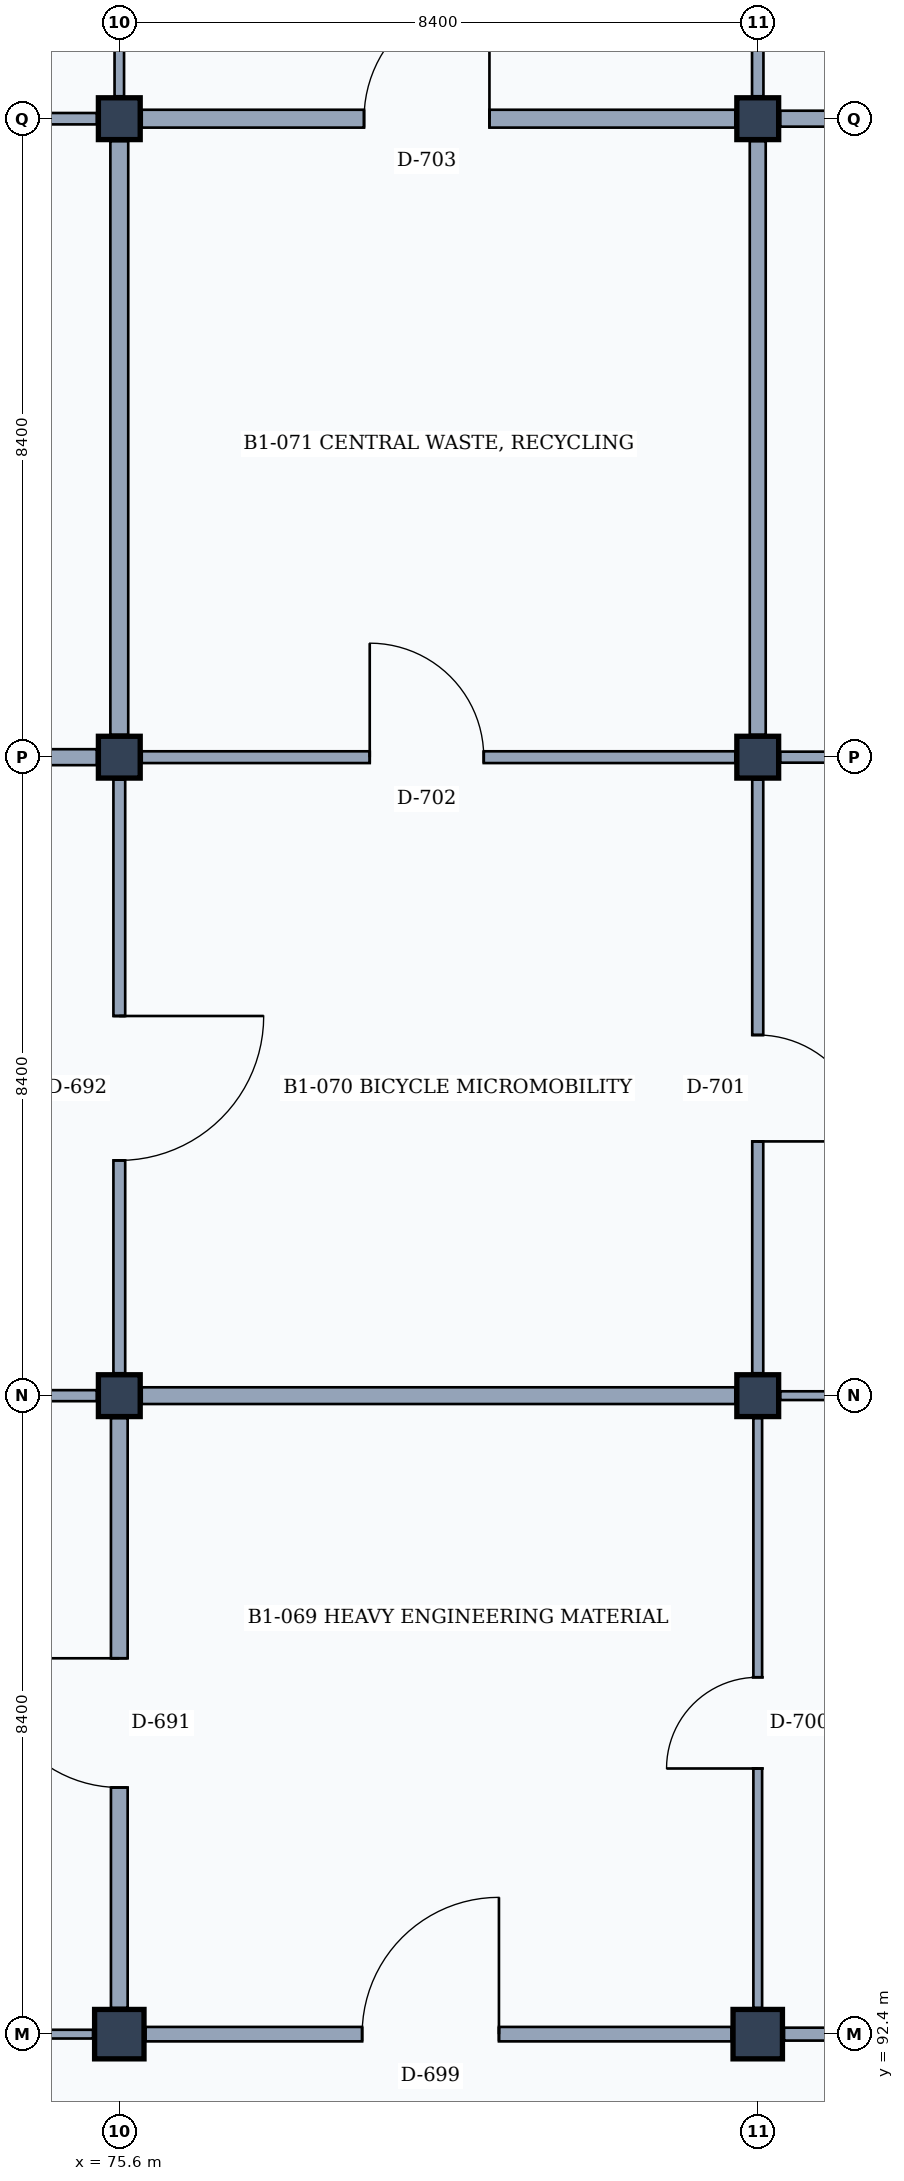
"""IFC4 building model, lengths in metres.
Left out: names, types, materials, properties, quantities, classifications, styles, units other than length and angle.
Written with IfcOpenShell. Run it as: python <this file> out.ifc"""

import sys

from ifc_helpers import new_model, si_unit, direction, frame, frame_2d, origin, origin_2d, place, context, subcontext, project, spatial, rectangle, extrude, element, fill, save


model = new_model("IFC4")
c1 = context("Model", 3, precision=1e-05, world=origin(), true_north=direction((0.0, 1.0)))
c2 = subcontext(c1, "Body", "Model", "MODEL_VIEW")
j1 = project(units=[si_unit("LENGTHUNIT", "METRE"), si_unit("PLANEANGLEUNIT", "RADIAN")], contexts=[c1])
p1 = place(None, origin())
s1 = spatial("IfcSite", under=j1, at=p1, CompositionType="ELEMENT")
p2 = place(p1, origin())
s2 = spatial("IfcBuilding", under=s1, at=p2, CompositionType="ELEMENT")
p3 = place(p2, frame((0.0, 0.0, -4.2)))
s3 = spatial("IfcBuildingStorey", under=s2, at=p3, CompositionType="ELEMENT", Elevation=-4.2)
p4 = place(p3, frame((75.6, 92.4, 0.0), z_axis=(0.0, 0.0, 1.0), x_axis=(1.0, 0.0, 0.0)))
e1 = element("IfcColumn", 1, at=p4, inside=s3, PredefinedType="COLUMN", context=c2, shape_type="SweptSolid", body=[
    extrude(rectangle(XDim=0.65, YDim=0.65, at=origin_2d()), origin(), (0.0, 0.0, 1.0), 4.2),
])
for number, where, z_axis, x_axis in (
    (2, (75.6, 100.8, 0.0), (0.0, 0.0, 1.0), (1.0, 0.0, 0.0)),
    (3, (75.6, 109.2, 0.0), (0.0, 0.0, 1.0), (1.0, 0.0, 0.0)),
    (4, (75.6, 117.6, 0.0), (0.0, 0.0, 1.0), (1.0, 0.0, 0.0)),
):
    element("IfcColumn", number, at=place(p3, frame(where, z_axis=z_axis, x_axis=x_axis)), inside=s3, PredefinedType="COLUMN", context=c2, shape_type="SweptSolid", body=[
        extrude(rectangle(XDim=0.55, YDim=0.55, at=origin_2d()), origin(), (0.0, 0.0, 1.0), 4.2),
    ])
p5 = place(p3, frame((84.0, 92.4, 0.0), z_axis=(0.0, 0.0, 1.0), x_axis=(1.0, 0.0, 0.0)))
e5 = element("IfcColumn", 5, at=p5, inside=s3, PredefinedType="COLUMN", context=c2, shape_type="SweptSolid", body=[
    extrude(rectangle(XDim=0.65, YDim=0.65, at=origin_2d()), origin(), (0.0, 0.0, 1.0), 4.2),
])
for number, where, z_axis, x_axis in (
    (6, (84.0, 100.8, 0.0), (0.0, 0.0, 1.0), (1.0, 0.0, 0.0)),
    (7, (84.0, 109.2, 0.0), (0.0, 0.0, 1.0), (1.0, 0.0, 0.0)),
    (8, (84.0, 117.6, 0.0), (0.0, 0.0, 1.0), (1.0, 0.0, 0.0)),
):
    element("IfcColumn", number, at=place(p3, frame(where, z_axis=z_axis, x_axis=x_axis)), inside=s3, PredefinedType="COLUMN", context=c2, shape_type="SweptSolid", body=[
        extrude(rectangle(XDim=0.55, YDim=0.55, at=origin_2d()), origin(), (0.0, 0.0, 1.0), 4.2),
    ])
p6 = place(p3, frame((67.545, 92.4, 0.0), z_axis=(0.0, 0.0, 1.0), x_axis=(1.0, 0.0, 0.0)))
e9 = element("IfcWall", 9, at=p6, inside=s3, PredefinedType="PARTITIONING", context=c2, shape_type="SweptSolid", body=[
    extrude(rectangle(XDim=7.71, YDim=0.115, at=frame_2d((3.855, 0.0))), origin(), (0.0, 0.0, 1.0), 2.93),
])
p7 = place(p6, frame((2.975, 0.0, 0.0)))
e10 = element("IfcOpeningElement", 10, at=p7, cuts=e9, PredefinedType="OPENING", context=c2, shape_type="SweptSolid", body=[
    extrude(rectangle(XDim=1.55, YDim=2.35, at=frame_2d((0.775, 1.175))), frame((0.0, 0.067, 0.0), z_axis=(0.0, -1.0, 0.0), x_axis=(1.0, 0.0, 0.0)), (0.0, 0.0, 1.0), 0.135),
])
p8 = place(p3, frame((75.6, 92.745, 0.0), z_axis=(0.0, 0.0, 1.0), x_axis=(0.0, 1.0, 0.0)))
e11 = element("IfcWall", 11, at=p8, inside=s3, PredefinedType="PARTITIONING", context=c2, shape_type="SweptSolid", body=[
    extrude(rectangle(XDim=7.76, YDim=0.22, at=frame_2d((3.88, 0.0))), origin(), (0.0, 0.0, 1.0), 3.23),
])
p9 = place(p8, frame((2.9, 0.0, 0.0)))
e12 = element("IfcOpeningElement", 12, at=p9, cuts=e11, PredefinedType="OPENING", context=c2, shape_type="SweptSolid", body=[
    extrude(rectangle(XDim=1.7, YDim=2.3, at=frame_2d((0.85, 1.15))), frame((0.0, 0.12, 0.0), z_axis=(0.0, -1.0, 0.0), x_axis=(1.0, 0.0, 0.0)), (0.0, 0.0, 1.0), 0.24),
])
p10 = place(p3, frame((67.545, 100.8, 0.0), z_axis=(0.0, 0.0, 1.0), x_axis=(1.0, 0.0, 0.0)))
e13 = element("IfcWall", 13, at=p10, inside=s3, PredefinedType="PARTITIONING", context=c2, shape_type="SweptSolid", body=[
    extrude(rectangle(XDim=7.76, YDim=0.145, at=frame_2d((3.88, 0.0))), origin(), (0.0, 0.0, 1.0), 2.93),
])
p11 = place(p3, frame((75.6, 101.095, 0.0), z_axis=(0.0, 0.0, 1.0), x_axis=(0.0, 1.0, 0.0)))
e14 = element("IfcWall", 14, at=p11, inside=s3, PredefinedType="PARTITIONING", context=c2, shape_type="SweptSolid", body=[
    extrude(rectangle(XDim=7.81, YDim=0.155, at=frame_2d((3.905, 0.0))), origin(), (0.0, 0.0, 1.0), 3.23),
])
p12 = place(p11, frame((2.8, 0.0, 0.0)))
e15 = element("IfcOpeningElement", 15, at=p12, cuts=e14, PredefinedType="OPENING", context=c2, shape_type="SweptSolid", body=[
    extrude(rectangle(XDim=1.9, YDim=2.4, at=frame_2d((0.95, 1.2))), frame((0.0, 0.087, 0.0), z_axis=(0.0, -1.0, 0.0), x_axis=(1.0, 0.0, 0.0)), (0.0, 0.0, 1.0), 0.175),
])
p13 = place(p3, frame((67.545, 109.2, 0.0), z_axis=(0.0, 0.0, 1.0), x_axis=(1.0, 0.0, 0.0)))
e16 = element("IfcWall", 16, at=p13, inside=s3, PredefinedType="PARTITIONING", context=c2, shape_type="SweptSolid", body=[
    extrude(rectangle(XDim=7.76, YDim=0.21, at=frame_2d((3.88, 0.0))), origin(), (0.0, 0.0, 1.0), 2.93),
])
p14 = place(p13, frame((3.3, 0.0, 0.0)))
e17 = element("IfcOpeningElement", 17, at=p14, cuts=e16, PredefinedType="OPENING", context=c2, shape_type="SweptSolid", body=[
    extrude(rectangle(XDim=0.9, YDim=2.1, at=frame_2d((0.45, 1.05))), frame((0.0, 0.115, 0.0), z_axis=(0.0, -1.0, 0.0), x_axis=(1.0, 0.0, 0.0)), (0.0, 0.0, 1.0), 0.23),
])
p15 = place(p3, frame((75.6, 109.495, 0.0), z_axis=(0.0, 0.0, 1.0), x_axis=(0.0, 1.0, 0.0)))
e18 = element("IfcWall", 18, at=p15, inside=s3, PredefinedType="PARTITIONING", context=c2, shape_type="SweptSolid", body=[
    extrude(rectangle(XDim=7.81, YDim=0.235, at=frame_2d((3.905, 0.0))), origin(), (0.0, 0.0, 1.0), 3.23),
])
p16 = place(p3, frame((67.545, 117.6, 0.0), z_axis=(0.0, 0.0, 1.0), x_axis=(1.0, 0.0, 0.0)))
e19 = element("IfcWall", 19, at=p16, inside=s3, PredefinedType="PARTITIONING", context=c2, shape_type="SweptSolid", body=[
    extrude(rectangle(XDim=7.76, YDim=0.15, at=frame_2d((3.88, 0.0))), origin(), (0.0, 0.0, 1.0), 2.93),
])
p17 = place(p16, frame((3.125, 0.0, 0.0)))
e20 = element("IfcOpeningElement", 20, at=p17, cuts=e19, PredefinedType="OPENING", context=c2, shape_type="SweptSolid", body=[
    extrude(rectangle(XDim=1.25, YDim=2.3, at=frame_2d((0.625, 1.15))), frame((0.0, 0.085, 0.0), z_axis=(0.0, -1.0, 0.0), x_axis=(1.0, 0.0, 0.0)), (0.0, 0.0, 1.0), 0.17),
])
p18 = place(p3, frame((75.6, 117.895, 0.0), z_axis=(0.0, 0.0, 1.0), x_axis=(0.0, 1.0, 0.0)))
e21 = element("IfcWall", 21, at=p18, inside=s3, PredefinedType="PARTITIONING", context=c2, shape_type="SweptSolid", body=[
    extrude(rectangle(XDim=7.81, YDim=0.125, at=frame_2d((3.905, 0.0))), origin(), (0.0, 0.0, 1.0), 3.23),
])
p19 = place(p3, frame((75.945, 92.4, 0.0), z_axis=(0.0, 0.0, 1.0), x_axis=(1.0, 0.0, 0.0)))
e22 = element("IfcWall", 22, at=p19, inside=s3, PredefinedType="PARTITIONING", context=c2, shape_type="SweptSolid", body=[
    extrude(rectangle(XDim=7.71, YDim=0.19, at=frame_2d((3.855, 0.0))), origin(), (0.0, 0.0, 1.0), 2.93),
])
p20 = place(p19, frame((2.85, 0.0, 0.0)))
e23 = element("IfcOpeningElement", 23, at=p20, cuts=e22, PredefinedType="OPENING", context=c2, shape_type="SweptSolid", body=[
    extrude(rectangle(XDim=1.8, YDim=2.3, at=frame_2d((0.9, 1.15))), frame((0.0, 0.105, 0.0), z_axis=(0.0, -1.0, 0.0), x_axis=(1.0, 0.0, 0.0)), (0.0, 0.0, 1.0), 0.21),
])
p21 = place(p3, frame((84.0, 92.745, 0.0), z_axis=(0.0, 0.0, 1.0), x_axis=(0.0, 1.0, 0.0)))
e24 = element("IfcWall", 24, at=p21, inside=s3, PredefinedType="PARTITIONING", context=c2, shape_type="SweptSolid", body=[
    extrude(rectangle(XDim=7.76, YDim=0.115, at=frame_2d((3.88, 0.0))), origin(), (0.0, 0.0, 1.0), 3.23),
])
p22 = place(p21, frame((3.15, 0.0, 0.0)))
e25 = element("IfcOpeningElement", 25, at=p22, cuts=e24, PredefinedType="OPENING", context=c2, shape_type="SweptSolid", body=[
    extrude(rectangle(XDim=1.2, YDim=2.2, at=frame_2d((0.6, 1.1))), frame((0.0, 0.067, 0.0), z_axis=(0.0, -1.0, 0.0), x_axis=(1.0, 0.0, 0.0)), (0.0, 0.0, 1.0), 0.135),
])
p23 = place(p3, frame((75.895, 100.8, 0.0), z_axis=(0.0, 0.0, 1.0), x_axis=(1.0, 0.0, 0.0)))
e26 = element("IfcWall", 26, at=p23, inside=s3, PredefinedType="PARTITIONING", context=c2, shape_type="SweptSolid", body=[
    extrude(rectangle(XDim=7.81, YDim=0.22, at=frame_2d((3.905, 0.0))), origin(), (0.0, 0.0, 1.0), 2.93),
])
p24 = place(p3, frame((84.0, 101.095, 0.0), z_axis=(0.0, 0.0, 1.0), x_axis=(0.0, 1.0, 0.0)))
e27 = element("IfcWall", 27, at=p24, inside=s3, PredefinedType="PARTITIONING", context=c2, shape_type="SweptSolid", body=[
    extrude(rectangle(XDim=7.81, YDim=0.145, at=frame_2d((3.905, 0.0))), origin(), (0.0, 0.0, 1.0), 3.23),
])
p25 = place(p24, frame((3.05, 0.0, 0.0)))
e28 = element("IfcOpeningElement", 28, at=p25, cuts=e27, PredefinedType="OPENING", context=c2, shape_type="SweptSolid", body=[
    extrude(rectangle(XDim=1.4, YDim=2.25, at=frame_2d((0.7, 1.125))), frame((0.0, 0.083, 0.0), z_axis=(0.0, -1.0, 0.0), x_axis=(1.0, 0.0, 0.0)), (0.0, 0.0, 1.0), 0.165),
])
p26 = place(p3, frame((75.895, 109.2, 0.0), z_axis=(0.0, 0.0, 1.0), x_axis=(1.0, 0.0, 0.0)))
e29 = element("IfcWall", 29, at=p26, inside=s3, PredefinedType="PARTITIONING", context=c2, shape_type="SweptSolid", body=[
    extrude(rectangle(XDim=7.81, YDim=0.155, at=frame_2d((3.905, 0.0))), origin(), (0.0, 0.0, 1.0), 2.93),
])
p27 = place(p26, frame((3.0, 0.0, 0.0)))
e30 = element("IfcOpeningElement", 30, at=p27, cuts=e29, PredefinedType="OPENING", context=c2, shape_type="SweptSolid", body=[
    extrude(rectangle(XDim=1.5, YDim=2.3, at=frame_2d((0.75, 1.15))), frame((0.0, 0.087, 0.0), z_axis=(0.0, -1.0, 0.0), x_axis=(1.0, 0.0, 0.0)), (0.0, 0.0, 1.0), 0.175),
])
p28 = place(p3, frame((84.0, 109.495, 0.0), z_axis=(0.0, 0.0, 1.0), x_axis=(0.0, 1.0, 0.0)))
e31 = element("IfcWall", 31, at=p28, inside=s3, PredefinedType="PARTITIONING", context=c2, shape_type="SweptSolid", body=[
    extrude(rectangle(XDim=7.81, YDim=0.21, at=frame_2d((3.905, 0.0))), origin(), (0.0, 0.0, 1.0), 3.23),
])
p29 = place(p3, frame((75.895, 117.6, 0.0), z_axis=(0.0, 0.0, 1.0), x_axis=(1.0, 0.0, 0.0)))
e32 = element("IfcWall", 32, at=p29, inside=s3, PredefinedType="PARTITIONING", context=c2, shape_type="SweptSolid", body=[
    extrude(rectangle(XDim=7.81, YDim=0.235, at=frame_2d((3.905, 0.0))), origin(), (0.0, 0.0, 1.0), 2.93),
])
p30 = place(p29, frame((2.925, 0.0, 0.0)))
e33 = element("IfcOpeningElement", 33, at=p30, cuts=e32, PredefinedType="OPENING", context=c2, shape_type="SweptSolid", body=[
    extrude(rectangle(XDim=1.65, YDim=2.25, at=frame_2d((0.825, 1.125))), frame((0.0, 0.127, 0.0), z_axis=(0.0, -1.0, 0.0), x_axis=(1.0, 0.0, 0.0)), (0.0, 0.0, 1.0), 0.255),
])
p31 = place(p3, frame((84.0, 117.895, 0.0), z_axis=(0.0, 0.0, 1.0), x_axis=(0.0, 1.0, 0.0)))
e34 = element("IfcWall", 34, at=p31, inside=s3, PredefinedType="PARTITIONING", context=c2, shape_type="SweptSolid", body=[
    extrude(rectangle(XDim=7.81, YDim=0.15, at=frame_2d((3.905, 0.0))), origin(), (0.0, 0.0, 1.0), 3.23),
])
p32 = place(p3, frame((84.345, 92.4, 0.0), z_axis=(0.0, 0.0, 1.0), x_axis=(1.0, 0.0, 0.0)))
e35 = element("IfcWall", 35, at=p32, inside=s3, PredefinedType="PARTITIONING", context=c2, shape_type="SweptSolid", body=[
    extrude(rectangle(XDim=7.71, YDim=0.17, at=frame_2d((3.855, 0.0))), origin(), (0.0, 0.0, 1.0), 2.93),
])
p33 = place(p32, frame((2.9, 0.0, 0.0)))
e36 = element("IfcOpeningElement", 36, at=p33, cuts=e35, PredefinedType="OPENING", context=c2, shape_type="SweptSolid", body=[
    extrude(rectangle(XDim=1.7, YDim=2.3, at=frame_2d((0.85, 1.15))), frame((0.0, 0.095, 0.0), z_axis=(0.0, -1.0, 0.0), x_axis=(1.0, 0.0, 0.0)), (0.0, 0.0, 1.0), 0.19),
])
p34 = place(p3, frame((84.295, 100.8, 0.0), z_axis=(0.0, 0.0, 1.0), x_axis=(1.0, 0.0, 0.0)))
e37 = element("IfcWall", 37, at=p34, inside=s3, PredefinedType="PARTITIONING", context=c2, shape_type="SweptSolid", body=[
    extrude(rectangle(XDim=7.81, YDim=0.115, at=frame_2d((3.905, 0.0))), origin(), (0.0, 0.0, 1.0), 2.93),
])
p35 = place(p3, frame((84.295, 109.2, 0.0), z_axis=(0.0, 0.0, 1.0), x_axis=(1.0, 0.0, 0.0)))
e38 = element("IfcWall", 38, at=p35, inside=s3, PredefinedType="PARTITIONING", context=c2, shape_type="SweptSolid", body=[
    extrude(rectangle(XDim=7.81, YDim=0.145, at=frame_2d((3.905, 0.0))), origin(), (0.0, 0.0, 1.0), 2.93),
])
p36 = place(p35, frame((3.125, 0.0, 0.0)))
e39 = element("IfcOpeningElement", 39, at=p36, cuts=e38, PredefinedType="OPENING", context=c2, shape_type="SweptSolid", body=[
    extrude(rectangle(XDim=1.25, YDim=2.3, at=frame_2d((0.625, 1.15))), frame((0.0, 0.083, 0.0), z_axis=(0.0, -1.0, 0.0), x_axis=(1.0, 0.0, 0.0)), (0.0, 0.0, 1.0), 0.165),
])
p37 = place(p3, frame((84.295, 117.6, 0.0), z_axis=(0.0, 0.0, 1.0), x_axis=(1.0, 0.0, 0.0)))
e40 = element("IfcWall", 40, at=p37, inside=s3, PredefinedType="PARTITIONING", context=c2, shape_type="SweptSolid", body=[
    extrude(rectangle(XDim=7.81, YDim=0.21, at=frame_2d((3.905, 0.0))), origin(), (0.0, 0.0, 1.0), 2.93),
])
p38 = place(p37, frame((3.075, 0.0, 0.0)))
e41 = element("IfcOpeningElement", 41, at=p38, cuts=e40, PredefinedType="OPENING", context=c2, shape_type="SweptSolid", body=[
    extrude(rectangle(XDim=1.35, YDim=2.25, at=frame_2d((0.675, 1.125))), frame((0.0, 0.115, 0.0), z_axis=(0.0, -1.0, 0.0), x_axis=(1.0, 0.0, 0.0)), (0.0, 0.0, 1.0), 0.23),
])
p39 = place(p9, origin())
e42 = element("IfcDoor", 42, at=p39, inside=s3, OperationType="SINGLE_SWING_RIGHT", PredefinedType="DOOR", context=c2, shape_type="SweptSolid", body=[
    extrude(rectangle(XDim=1.7, YDim=2.3, at=frame_2d((0.85, 1.15))), frame((0.0, 0.025, 0.0), z_axis=(0.0, -1.0, 0.0), x_axis=(1.0, 0.0, 0.0)), (0.0, 0.0, 1.0), 0.05),
])
fill(e12, e42)
p40 = place(p12, frame((1.9, 0.0, 0.0), z_axis=(0.0, 0.0, 1.0), x_axis=(-1.0, 0.0, 0.0)))
e43 = element("IfcDoor", 43, at=p40, inside=s3, OperationType="SINGLE_SWING_LEFT", PredefinedType="DOOR", context=c2, shape_type="SweptSolid", body=[
    extrude(rectangle(XDim=1.9, YDim=2.4, at=frame_2d((0.95, 1.2))), frame((0.0, 0.025, 0.0), z_axis=(0.0, -1.0, 0.0), x_axis=(1.0, 0.0, 0.0)), (0.0, 0.0, 1.0), 0.05),
])
fill(e15, e43)
p41 = place(p20, origin())
e44 = element("IfcDoor", 44, at=p41, inside=s3, OperationType="SINGLE_SWING_RIGHT", PredefinedType="DOOR", context=c2, shape_type="SweptSolid", body=[
    extrude(rectangle(XDim=1.8, YDim=2.3, at=frame_2d((0.9, 1.15))), frame((0.0, 0.025, 0.0), z_axis=(0.0, -1.0, 0.0), x_axis=(1.0, 0.0, 0.0)), (0.0, 0.0, 1.0), 0.05),
])
fill(e23, e44)
p42 = place(p22, origin())
e45 = element("IfcDoor", 45, at=p42, inside=s3, OperationType="SINGLE_SWING_LEFT", PredefinedType="DOOR", context=c2, shape_type="SweptSolid", body=[
    extrude(rectangle(XDim=1.2, YDim=2.2, at=frame_2d((0.6, 1.1))), frame((0.0, 0.025, 0.0), z_axis=(0.0, -1.0, 0.0), x_axis=(1.0, 0.0, 0.0)), (0.0, 0.0, 1.0), 0.05),
])
fill(e25, e45)
p43 = place(p25, frame((1.4, 0.0, 0.0), z_axis=(0.0, 0.0, 1.0), x_axis=(-1.0, 0.0, 0.0)))
e46 = element("IfcDoor", 46, at=p43, inside=s3, OperationType="SINGLE_SWING_RIGHT", PredefinedType="DOOR", context=c2, shape_type="SweptSolid", body=[
    extrude(rectangle(XDim=1.4, YDim=2.25, at=frame_2d((0.7, 1.125))), frame((0.0, 0.025, 0.0), z_axis=(0.0, -1.0, 0.0), x_axis=(1.0, 0.0, 0.0)), (0.0, 0.0, 1.0), 0.05),
])
fill(e28, e46)
p44 = place(p27, origin())
e47 = element("IfcDoor", 47, at=p44, inside=s3, OperationType="SINGLE_SWING_LEFT", PredefinedType="DOOR", context=c2, shape_type="SweptSolid", body=[
    extrude(rectangle(XDim=1.5, YDim=2.3, at=frame_2d((0.75, 1.15))), frame((0.0, 0.025, 0.0), z_axis=(0.0, -1.0, 0.0), x_axis=(1.0, 0.0, 0.0)), (0.0, 0.0, 1.0), 0.05),
])
fill(e30, e47)
p45 = place(p30, origin())
e48 = element("IfcDoor", 48, at=p45, inside=s3, OperationType="SINGLE_SWING_RIGHT", PredefinedType="DOOR", context=c2, shape_type="SweptSolid", body=[
    extrude(rectangle(XDim=1.65, YDim=2.25, at=frame_2d((0.825, 1.125))), frame((0.0, 0.025, 0.0), z_axis=(0.0, -1.0, 0.0), x_axis=(1.0, 0.0, 0.0)), (0.0, 0.0, 1.0), 0.05),
])
fill(e33, e48)
save(model, sys.argv[1])
